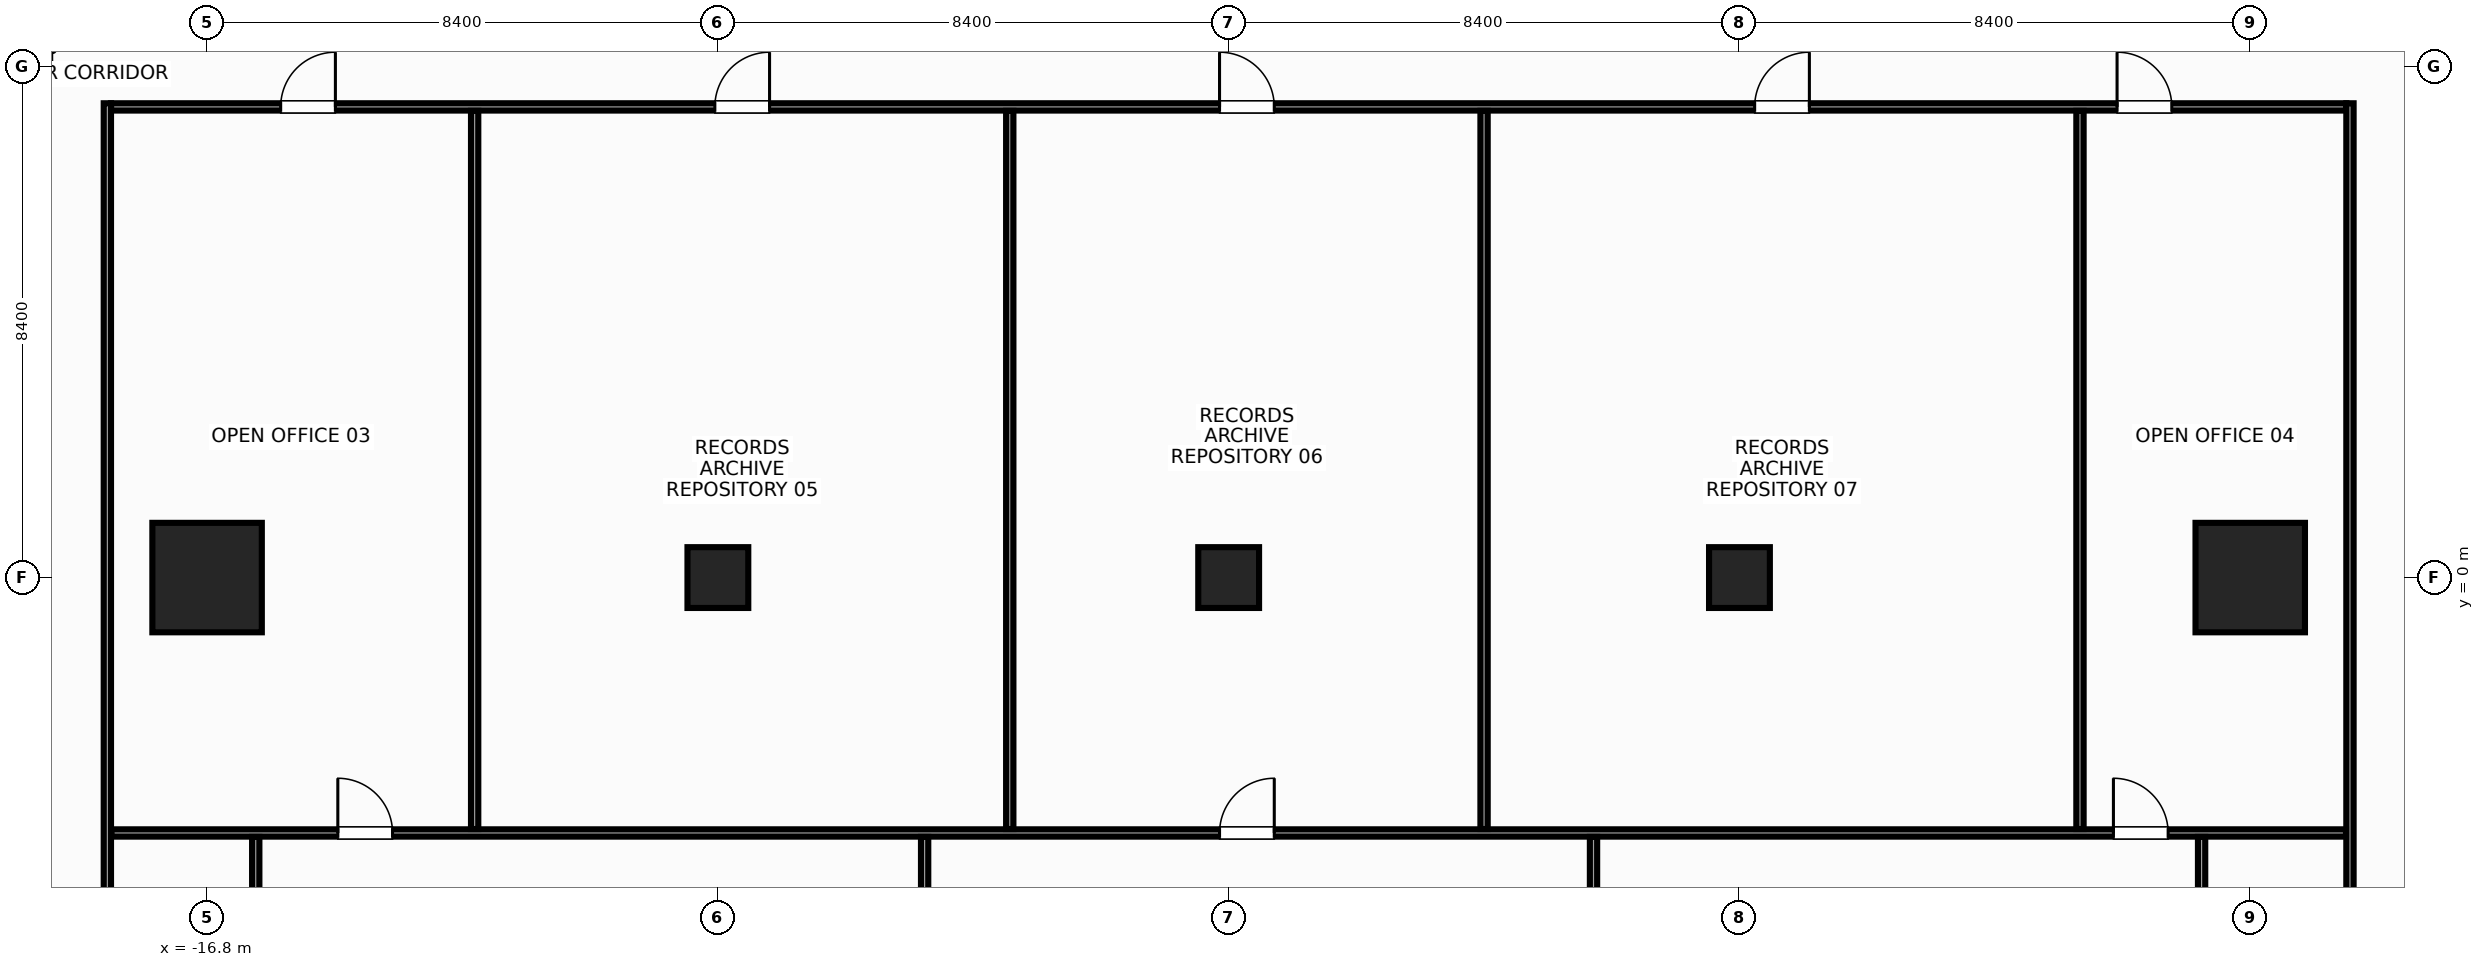
"""IFC4 building model, lengths in metres.
Left out: names, types, materials, properties, quantities, classifications, styles, units other than length and angle.
Written with IfcOpenShell. Run it as: python <this file> out.ifc"""

import sys

from ifc_helpers import new_model, si_unit, direction, frame, frame_2d, origin, origin_with_axes, origin_2d, place, context, subcontext, project, spatial, rectangle, hollow_rectangle, extrude, source, transform, mapped, element, fill, save


model = new_model("IFC4")
c1 = context("Model", 3, precision=1e-05, world=origin(), true_north=direction((0.0, 1.0)))
c2 = subcontext(c1, "Body", "Model", "MODEL_VIEW")
j1 = project(units=[si_unit("LENGTHUNIT", "METRE"), si_unit("PLANEANGLEUNIT", "RADIAN")], contexts=[c1])
p1 = place(None, origin())
s1 = spatial("IfcSite", under=j1, at=p1, CompositionType="ELEMENT")
p2 = place(p1, origin())
s2 = spatial("IfcBuilding", under=s1, at=p2, CompositionType="ELEMENT")
p3 = place(p2, frame((0.0, 0.0, 30.8)))
s3 = spatial("IfcBuildingStorey", under=s2, at=p3, CompositionType="ELEMENT", Elevation=30.8)
m1 = source(origin(), c2, "Body", "SweptSolid", [
    extrude(rectangle(XDim=1.8, YDim=1.8, at=origin_2d()), origin(), (0.0, 0.0, 1.0), 3.6),
])
for number, where, z_axis, x_axis in (
    (1, (-16.8, 0.0, 0.0), (0.0, 0.0, 1.0), (1.0, 0.0, 0.0)),
    (2, (16.8, 0.0, 0.0), (0.0, 0.0, 1.0), (1.0, 0.0, 0.0)),
):
    element("IfcColumn", number, at=place(p3, frame(where, z_axis=z_axis, x_axis=x_axis)), inside=s3, PredefinedType="COLUMN", context=c2, shape_type="MappedRepresentation", body=[
        mapped(m1, transform((0.0, 0.0, 0.0), x_axis=(1.0, 0.0, 0.0), y_axis=(0.0, 1.0, 0.0), z_axis=(0.0, 0.0, 1.0), scale=1.0)),
    ])
m2 = source(origin(), c2, "Body", "SweptSolid", [
    extrude(hollow_rectangle(XDim=1.0, YDim=1.0, WallThickness=0.045, at=origin_2d()), origin(), (0.0, 0.0, 1.0), 3.6),
])
for number, where, z_axis, x_axis in (
    (3, (-8.4, 0.0, 0.0), (0.0, 0.0, 1.0), (1.0, 0.0, 0.0)),
    (4, (8.4, 0.0, 0.0), (0.0, 0.0, 1.0), (1.0, 0.0, 0.0)),
):
    element("IfcColumn", number, at=place(p3, frame(where, z_axis=z_axis, x_axis=x_axis)), inside=s3, PredefinedType="COLUMN", context=c2, shape_type="MappedRepresentation", body=[
        mapped(m2, transform((0.0, 0.0, 0.0), x_axis=(1.0, 0.0, 0.0), y_axis=(0.0, 1.0, 0.0), z_axis=(0.0, 0.0, 1.0), scale=1.0)),
    ])
m3 = source(origin(), c2, "Body", "SweptSolid", [
    extrude(rectangle(XDim=1.0, YDim=1.0, at=origin_2d()), origin(), (0.0, 0.0, 1.0), 3.6),
])
p4 = place(p3, origin_with_axes())
e5 = element("IfcColumn", 5, at=p4, inside=s3, PredefinedType="COLUMN", context=c2, shape_type="MappedRepresentation", body=[
    mapped(m3, transform((0.0, 0.0, 0.0), x_axis=(1.0, 0.0, 0.0), y_axis=(0.0, 1.0, 0.0), z_axis=(0.0, 0.0, 1.0), scale=1.0)),
])
m4 = source(origin(), c2, "Body", "SweptSolid", [
    extrude(rectangle(XDim=36.76, YDim=0.12, at=frame_2d((18.38, 0.0))), origin(), (0.0, 0.0, 1.0), 2.745),
])
p5 = place(p3, frame((-18.38, 7.74, 0.0), z_axis=(0.0, 0.0, 1.0), x_axis=(1.0, 0.0, 0.0)))
e6 = element("IfcWall", 6, at=p5, inside=s3, PredefinedType="PARTITIONING", context=c2, shape_type="MappedRepresentation", body=[
    mapped(m4, transform((0.0, 0.0, 0.0), x_axis=(1.0, 0.0, 0.0), y_axis=(0.0, 1.0, 0.0), z_axis=(0.0, 0.0, 1.0), scale=1.0)),
])
p6 = place(p5, frame((2.79, 0.0, 0.0)))
e7 = element("IfcOpeningElement", 7, at=p6, cuts=e6, PredefinedType="OPENING", context=c2, shape_type="SweptSolid", body=[
    extrude(rectangle(XDim=0.9, YDim=2.15, at=frame_2d((0.45, 1.075))), frame((0.0, 0.072, 0.0), z_axis=(0.0, -1.0, 0.0), x_axis=(1.0, 0.0, 0.0)), (0.0, 0.0, 1.0), 0.144),
])
p7 = place(p5, frame((32.99, 0.0, 0.0)))
e8 = element("IfcOpeningElement", 8, at=p7, cuts=e6, PredefinedType="OPENING", context=c2, shape_type="SweptSolid", body=[
    extrude(rectangle(XDim=0.9, YDim=2.15, at=frame_2d((0.45, 1.075))), frame((0.0, 0.072, 0.0), z_axis=(0.0, -1.0, 0.0), x_axis=(1.0, 0.0, 0.0)), (0.0, 0.0, 1.0), 0.144),
])
p8 = place(p5, frame((9.93, 0.0, 0.0)))
e9 = element("IfcOpeningElement", 9, at=p8, cuts=e6, PredefinedType="OPENING", context=c2, shape_type="SweptSolid", body=[
    extrude(rectangle(XDim=0.9, YDim=2.15, at=frame_2d((0.45, 1.075))), frame((0.0, 0.072, 0.0), z_axis=(0.0, -1.0, 0.0), x_axis=(1.0, 0.0, 0.0)), (0.0, 0.0, 1.0), 0.144),
])
p9 = place(p5, frame((18.23, 0.0, 0.0)))
e10 = element("IfcOpeningElement", 10, at=p9, cuts=e6, PredefinedType="OPENING", context=c2, shape_type="SweptSolid", body=[
    extrude(rectangle(XDim=0.9, YDim=2.15, at=frame_2d((0.45, 1.075))), frame((0.0, 0.072, 0.0), z_axis=(0.0, -1.0, 0.0), x_axis=(1.0, 0.0, 0.0)), (0.0, 0.0, 1.0), 0.144),
])
p10 = place(p5, frame((27.03, 0.0, 0.0)))
e11 = element("IfcOpeningElement", 11, at=p10, cuts=e6, PredefinedType="OPENING", context=c2, shape_type="SweptSolid", body=[
    extrude(rectangle(XDim=0.9, YDim=2.15, at=frame_2d((0.45, 1.075))), frame((0.0, 0.072, 0.0), z_axis=(0.0, -1.0, 0.0), x_axis=(1.0, 0.0, 0.0)), (0.0, 0.0, 1.0), 0.144),
])
m5 = source(origin(), c2, "Body", "SweptSolid", [
    extrude(rectangle(XDim=21.995, YDim=0.12, at=frame_2d((10.998, 0.0))), origin(), (0.0, 0.0, 1.0), 2.745),
])
for number, where, z_axis, x_axis in (
    (12, (-18.44, -14.195, 0.0), (0.0, 0.0, 1.0), (0.0, 1.0, 0.0)),
    (13, (18.44, -14.195, 0.0), (0.0, 0.0, 1.0), (0.0, 1.0, 0.0)),
):
    element("IfcWall", number, at=place(p3, frame(where, z_axis=z_axis, x_axis=x_axis)), inside=s3, PredefinedType="PARTITIONING", context=c2, shape_type="MappedRepresentation", body=[
        mapped(m5, transform((0.0, 0.0, 0.0), x_axis=(1.0, 0.0, 0.0), y_axis=(0.0, 1.0, 0.0), z_axis=(0.0, 0.0, 1.0), scale=1.0)),
    ])
m6 = source(origin(), c2, "Body", "SweptSolid", [
    extrude(rectangle(XDim=36.75, YDim=0.12, at=frame_2d((18.375, 0.0))), origin(), (0.0, 0.0, 1.0), 2.745),
])
p11 = place(p3, frame((-18.375, -4.2, 0.0), z_axis=(0.0, 0.0, 1.0), x_axis=(1.0, 0.0, 0.0)))
e14 = element("IfcWall", 14, at=p11, inside=s3, PredefinedType="PARTITIONING", context=c2, shape_type="MappedRepresentation", body=[
    mapped(m6, transform((0.0, 0.0, 0.0), x_axis=(1.0, 0.0, 0.0), y_axis=(0.0, 1.0, 0.0), z_axis=(0.0, 0.0, 1.0), scale=1.0)),
])
p12 = place(p11, frame((3.725, 0.0, 0.0)))
e15 = element("IfcOpeningElement", 15, at=p12, cuts=e14, PredefinedType="OPENING", context=c2, shape_type="SweptSolid", body=[
    extrude(rectangle(XDim=0.9, YDim=2.15, at=frame_2d((0.45, 1.075))), frame((0.0, 0.072, 0.0), z_axis=(0.0, -1.0, 0.0), x_axis=(1.0, 0.0, 0.0)), (0.0, 0.0, 1.0), 0.144),
])
p13 = place(p11, frame((18.225, 0.0, 0.0)))
e16 = element("IfcOpeningElement", 16, at=p13, cuts=e14, PredefinedType="OPENING", context=c2, shape_type="SweptSolid", body=[
    extrude(rectangle(XDim=0.9, YDim=2.15, at=frame_2d((0.45, 1.075))), frame((0.0, 0.072, 0.0), z_axis=(0.0, -1.0, 0.0), x_axis=(1.0, 0.0, 0.0)), (0.0, 0.0, 1.0), 0.144),
])
p14 = place(p11, frame((32.925, 0.0, 0.0)))
e17 = element("IfcOpeningElement", 17, at=p14, cuts=e14, PredefinedType="OPENING", context=c2, shape_type="SweptSolid", body=[
    extrude(rectangle(XDim=0.9, YDim=2.15, at=frame_2d((0.45, 1.075))), frame((0.0, 0.072, 0.0), z_axis=(0.0, -1.0, 0.0), x_axis=(1.0, 0.0, 0.0)), (0.0, 0.0, 1.0), 0.144),
])
m7 = source(origin(), c2, "Body", "SweptSolid", [
    extrude(rectangle(XDim=11.81, YDim=0.12, at=frame_2d((5.905, 0.0))), origin(), (0.0, 0.0, 1.0), 2.301),
])
for number, where, z_axis, x_axis in (
    (18, (-12.4, -4.135, 0.0), (0.0, 0.0, 1.0), (0.0, 1.0, 0.0)),
    (19, (-3.6, -4.135, 0.0), (0.0, 0.0, 1.0), (0.0, 1.0, 0.0)),
    (20, (4.2, -4.135, 0.0), (0.0, 0.0, 1.0), (0.0, 1.0, 0.0)),
    (21, (14.0, -4.135, 0.0), (0.0, 0.0, 1.0), (0.0, 1.0, 0.0)),
):
    element("IfcWall", number, at=place(p3, frame(where, z_axis=z_axis, x_axis=x_axis)), inside=s3, PredefinedType="PARTITIONING", context=c2, shape_type="MappedRepresentation", body=[
        mapped(m7, transform((0.0, 0.0, 0.0), x_axis=(1.0, 0.0, 0.0), y_axis=(0.0, 1.0, 0.0), z_axis=(0.0, 0.0, 1.0), scale=1.0)),
    ])
m8 = source(origin(), c2, "Body", "SweptSolid", [
    extrude(rectangle(XDim=5.625, YDim=0.12, at=frame_2d((2.812, 0.0))), origin(), (0.0, 0.0, 1.0), 3.36),
])
p15 = place(p3, frame((-16.0, -9.89, 0.0), z_axis=(0.0, 0.0, 1.0), x_axis=(0.0, 1.0, 0.0)))
e22 = element("IfcWall", 22, at=p15, inside=s3, PredefinedType="PARTITIONING", context=c2, shape_type="MappedRepresentation", body=[
    mapped(m8, transform((0.0, 0.0, 0.0), x_axis=(1.0, 0.0, 0.0), y_axis=(0.0, 1.0, 0.0), z_axis=(0.0, 0.0, 1.0), scale=1.0)),
])
m9 = source(origin(), c2, "Body", "SweptSolid", [
    extrude(rectangle(XDim=22.585, YDim=0.12, at=frame_2d((11.292, 0.0))), origin(), (0.0, 0.0, 1.0), 2.745),
])
for number, where, z_axis, x_axis in (
    (23, (-5.0, -26.85, 0.0), (0.0, 0.0, 1.0), (0.0, 1.0, 0.0)),
    (24, (6.0, -26.85, 0.0), (0.0, 0.0, 1.0), (0.0, 1.0, 0.0)),
):
    element("IfcWall", number, at=place(p3, frame(where, z_axis=z_axis, x_axis=x_axis)), inside=s3, PredefinedType="PARTITIONING", context=c2, shape_type="MappedRepresentation", body=[
        mapped(m9, transform((0.0, 0.0, 0.0), x_axis=(1.0, 0.0, 0.0), y_axis=(0.0, 1.0, 0.0), z_axis=(0.0, 0.0, 1.0), scale=1.0)),
    ])
p16 = place(p3, frame((16.0, -9.89, 0.0), z_axis=(0.0, 0.0, 1.0), x_axis=(0.0, 1.0, 0.0)))
e25 = element("IfcWall", 25, at=p16, inside=s3, PredefinedType="PARTITIONING", context=c2, shape_type="MappedRepresentation", body=[
    mapped(m8, transform((0.0, 0.0, 0.0), x_axis=(1.0, 0.0, 0.0), y_axis=(0.0, 1.0, 0.0), z_axis=(0.0, 0.0, 1.0), scale=1.0)),
])
m10 = source(origin(), c2, "Body", "SweptSolid", [
    extrude(rectangle(XDim=0.9, YDim=2.15, at=frame_2d((0.45, 1.075))), frame((0.0, 0.025, 0.0), z_axis=(0.0, -1.0, 0.0), x_axis=(1.0, 0.0, 0.0)), (0.0, 0.0, 1.0), 0.05),
])
p17 = place(p6, origin())
e26 = element("IfcDoor", 26, at=p17, inside=s3, OperationType="SINGLE_SWING_RIGHT", PredefinedType="DOOR", context=c2, shape_type="MappedRepresentation", body=[
    mapped(m10, transform((0.0, 0.0, 0.0), x_axis=(1.0, 0.0, 0.0), y_axis=(0.0, 1.0, 0.0), z_axis=(0.0, 0.0, 1.0), scale=1.0)),
])
fill(e7, e26)
p18 = place(p7, origin())
e27 = element("IfcDoor", 27, at=p18, inside=s3, OperationType="SINGLE_SWING_LEFT", PredefinedType="DOOR", context=c2, shape_type="MappedRepresentation", body=[
    mapped(m10, transform((0.0, 0.0, 0.0), x_axis=(1.0, 0.0, 0.0), y_axis=(0.0, 1.0, 0.0), z_axis=(0.0, 0.0, 1.0), scale=1.0)),
])
fill(e8, e27)
p19 = place(p8, origin())
e28 = element("IfcDoor", 28, at=p19, inside=s3, OperationType="SINGLE_SWING_RIGHT", PredefinedType="DOOR", context=c2, shape_type="MappedRepresentation", body=[
    mapped(m10, transform((0.0, 0.0, 0.0), x_axis=(1.0, 0.0, 0.0), y_axis=(0.0, 1.0, 0.0), z_axis=(0.0, 0.0, 1.0), scale=1.0)),
])
fill(e9, e28)
p20 = place(p9, origin())
e29 = element("IfcDoor", 29, at=p20, inside=s3, OperationType="SINGLE_SWING_LEFT", PredefinedType="DOOR", context=c2, shape_type="MappedRepresentation", body=[
    mapped(m10, transform((0.0, 0.0, 0.0), x_axis=(1.0, 0.0, 0.0), y_axis=(0.0, 1.0, 0.0), z_axis=(0.0, 0.0, 1.0), scale=1.0)),
])
fill(e10, e29)
p21 = place(p10, origin())
e30 = element("IfcDoor", 30, at=p21, inside=s3, OperationType="SINGLE_SWING_RIGHT", PredefinedType="DOOR", context=c2, shape_type="MappedRepresentation", body=[
    mapped(m10, transform((0.0, 0.0, 0.0), x_axis=(1.0, 0.0, 0.0), y_axis=(0.0, 1.0, 0.0), z_axis=(0.0, 0.0, 1.0), scale=1.0)),
])
fill(e11, e30)
p22 = place(p12, origin())
e31 = element("IfcDoor", 31, at=p22, inside=s3, OperationType="SINGLE_SWING_LEFT", PredefinedType="DOOR", context=c2, shape_type="MappedRepresentation", body=[
    mapped(m10, transform((0.0, 0.0, 0.0), x_axis=(1.0, 0.0, 0.0), y_axis=(0.0, 1.0, 0.0), z_axis=(0.0, 0.0, 1.0), scale=1.0)),
])
fill(e15, e31)
p23 = place(p13, origin())
e32 = element("IfcDoor", 32, at=p23, inside=s3, OperationType="SINGLE_SWING_RIGHT", PredefinedType="DOOR", context=c2, shape_type="MappedRepresentation", body=[
    mapped(m10, transform((0.0, 0.0, 0.0), x_axis=(1.0, 0.0, 0.0), y_axis=(0.0, 1.0, 0.0), z_axis=(0.0, 0.0, 1.0), scale=1.0)),
])
fill(e16, e32)
p24 = place(p14, origin())
e33 = element("IfcDoor", 33, at=p24, inside=s3, OperationType="SINGLE_SWING_LEFT", PredefinedType="DOOR", context=c2, shape_type="MappedRepresentation", body=[
    mapped(m10, transform((0.0, 0.0, 0.0), x_axis=(1.0, 0.0, 0.0), y_axis=(0.0, 1.0, 0.0), z_axis=(0.0, 0.0, 1.0), scale=1.0)),
])
fill(e17, e33)
save(model, sys.argv[1])
